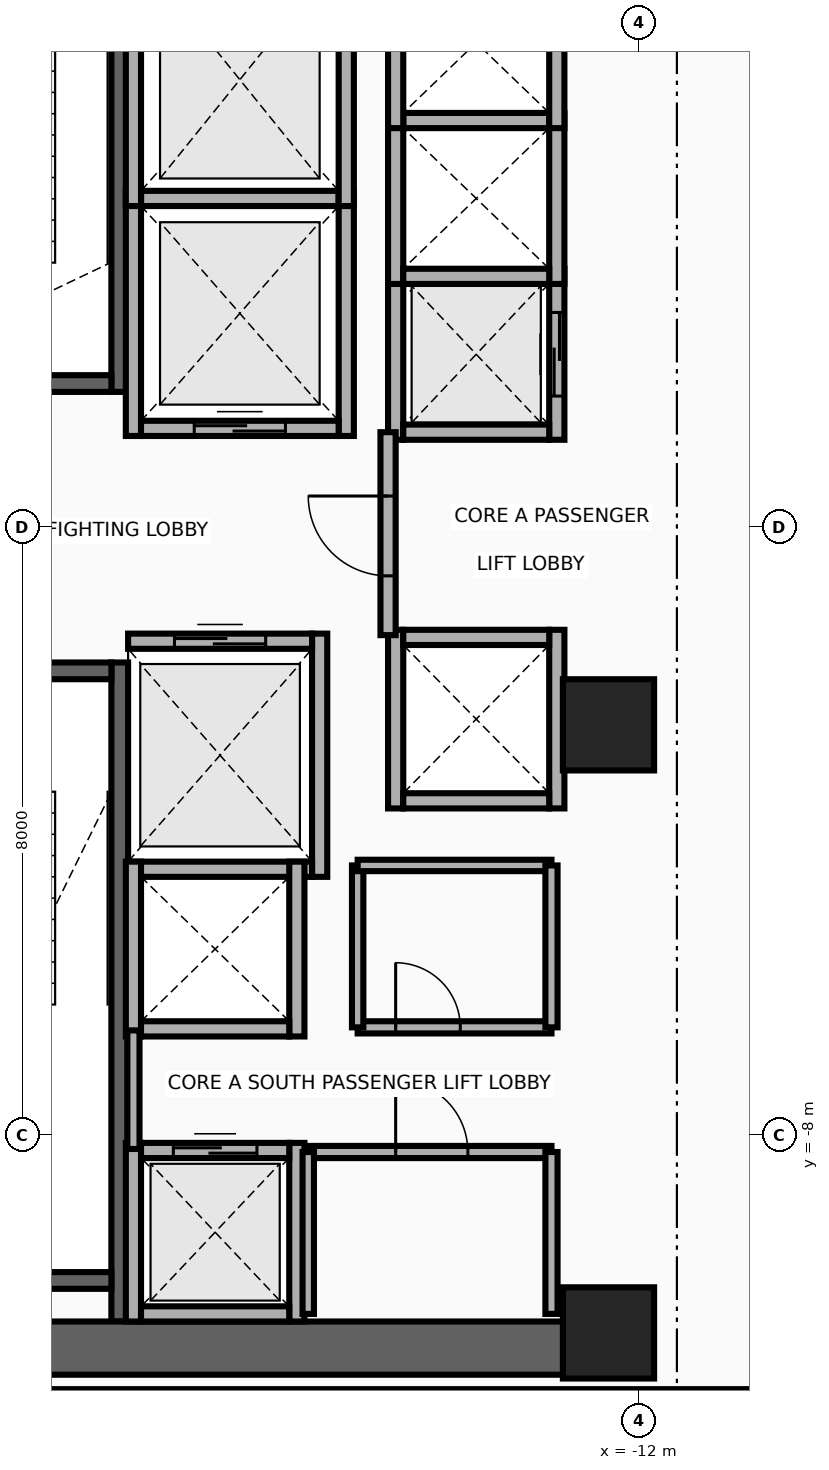
"""IFC4 building model, lengths in metres.
Left out: names, types, materials, properties, quantities, classifications, styles, units other than length and angle.
Written with IfcOpenShell. Run it as: python <this file> out.ifc"""

import sys

from ifc_helpers import new_model, si_unit, direction, frame, frame_2d, origin, origin_2d, place, context, subcontext, project, spatial, rectangle, extrude, source, transform, mapped, element, fill, save


model = new_model("IFC4")
c1 = context("Model", 3, precision=1e-05, world=origin(), true_north=direction((0.0, 1.0)))
c2 = subcontext(c1, "Body", "Model", "MODEL_VIEW")
j1 = project(units=[si_unit("LENGTHUNIT", "METRE"), si_unit("PLANEANGLEUNIT", "RADIAN")], contexts=[c1])
p1 = place(None, origin())
s1 = spatial("IfcSite", under=j1, at=p1, CompositionType="ELEMENT")
p2 = place(p1, origin())
s2 = spatial("IfcBuilding", under=s1, at=p2, CompositionType="ELEMENT")
p3 = place(p2, frame((0.0, 0.0, 142.7)))
s3 = spatial("IfcBuildingStorey", under=s2, at=p3, CompositionType="ELEMENT", Elevation=142.7)
p4 = place(p3, frame((-18.83, 1.78, 0.0), z_axis=(0.0, 0.0, 1.0), x_axis=(0.0, 1.0, 0.0)))
e1 = element("IfcWall", 1, at=p4, inside=s3, PredefinedType="SHEAR", context=c2, shape_type="SweptSolid", body=[
    extrude(rectangle(XDim=8.67, YDim=0.22, at=frame_2d((4.335, 0.0))), origin(), (0.0, 0.0, 1.0), 3.46),
])
p5 = place(p3, frame((-22.05, 1.89, 0.0), z_axis=(0.0, 0.0, 1.0), x_axis=(1.0, 0.0, 0.0)))
e2 = element("IfcWall", 2, at=p5, inside=s3, PredefinedType="SHEAR", context=c2, shape_type="SweptSolid", body=[
    extrude(rectangle(XDim=3.11, YDim=0.22, at=frame_2d((1.555, 0.0))), origin(), (0.0, 0.0, 1.0), 3.46),
])
p6 = place(p5, frame((1.0, 0.0, 0.0)))
e3 = element("IfcOpeningElement", 3, at=p6, cuts=e2, PredefinedType="OPENING", context=c2, shape_type="SweptSolid", body=[
    extrude(rectangle(XDim=1.1, YDim=2.15, at=frame_2d((0.55, 1.075))), frame((0.0, 0.125, 0.0), z_axis=(0.0, -1.0, 0.0), x_axis=(1.0, 0.0, 0.0)), (0.0, 0.0, 1.0), 0.25),
])
p7 = place(p3, frame((-18.83, -10.45, 0.0), z_axis=(0.0, 0.0, 1.0), x_axis=(0.0, 1.0, 0.0)))
e4 = element("IfcWall", 4, at=p7, inside=s3, PredefinedType="SHEAR", context=c2, shape_type="SweptSolid", body=[
    extrude(rectangle(XDim=8.67, YDim=0.22, at=frame_2d((4.335, 0.0))), origin(), (0.0, 0.0, 1.0), 3.46),
])
p8 = place(p3, frame((-22.05, -9.91, 0.0), z_axis=(0.0, 0.0, 1.0), x_axis=(1.0, 0.0, 0.0)))
e5 = element("IfcWall", 5, at=p8, inside=s3, PredefinedType="SHEAR", context=c2, shape_type="SweptSolid", body=[
    extrude(rectangle(XDim=3.11, YDim=0.22, at=frame_2d((1.555, 0.0))), origin(), (0.0, 0.0, 1.0), 3.46),
])
p9 = place(p3, frame((-22.05, -1.89, 0.0), z_axis=(0.0, 0.0, 1.0), x_axis=(1.0, 0.0, 0.0)))
e6 = element("IfcWall", 6, at=p9, inside=s3, PredefinedType="SHEAR", context=c2, shape_type="SweptSolid", body=[
    extrude(rectangle(XDim=3.11, YDim=0.22, at=frame_2d((1.555, 0.0))), origin(), (0.0, 0.0, 1.0), 3.46),
])
p10 = place(p9, frame((1.0, 0.0, 0.0)))
e7 = element("IfcOpeningElement", 7, at=p10, cuts=e6, PredefinedType="OPENING", context=c2, shape_type="SweptSolid", body=[
    extrude(rectangle(XDim=1.1, YDim=2.15, at=frame_2d((0.55, 1.075))), frame((0.0, 0.125, 0.0), z_axis=(0.0, -1.0, 0.0), x_axis=(1.0, 0.0, 0.0)), (0.0, 0.0, 1.0), 0.25),
])
p11 = place(p3, frame((-22.65, -10.8, 0.0), z_axis=(0.0, 0.0, 1.0), x_axis=(1.0, 0.0, 0.0)))
e8 = element("IfcWall", 8, at=p11, inside=s3, PredefinedType="SHEAR", context=c2, shape_type="SweptSolid", body=[
    extrude(rectangle(XDim=10.25, YDim=0.7, at=frame_2d((5.125, 0.0))), origin(), (0.0, 0.0, 1.0), 3.46),
])
m1 = source(origin(), c2, "Body", "SweptSolid", [
    extrude(rectangle(XDim=1.2, YDim=1.2, at=origin_2d()), origin(), (0.0, 0.0, 1.0), 3.7),
])
for number, where, z_axis, x_axis in (
    (9, (-12.4, -10.6, 0.0), (0.0, 0.0, 1.0), (1.0, 0.0, 0.0)),
    (10, (-12.4, -2.6, 0.0), (0.0, 0.0, 1.0), (1.0, 0.0, 0.0)),
):
    element("IfcColumn", number, at=place(p3, frame(where, z_axis=z_axis, x_axis=x_axis)), inside=s3, PredefinedType="COLUMN", context=c2, shape_type="MappedRepresentation", body=[
        mapped(m1, transform((0.0, 0.0, 0.0), x_axis=(1.0, 0.0, 0.0), y_axis=(0.0, 1.0, 0.0), z_axis=(0.0, 0.0, 1.0), scale=1.0)),
    ])
for number, where, z_axis, x_axis in (
    (11, (-18.65, 1.2, 0.0), (0.0, 0.0, 1.0), (0.0, 1.0, 0.0)),
    (12, (-15.85, 1.2, 0.0), (0.0, 0.0, 1.0), (0.0, 1.0, 0.0)),
):
    element("IfcWall", number, at=place(p3, frame(where, z_axis=z_axis, x_axis=x_axis)), inside=s3, PredefinedType="MOVABLE", context=c2, shape_type="SweptSolid", body=[
        extrude(rectangle(XDim=3.225, YDim=0.2, at=frame_2d((1.613, 0.0))), origin(), (0.0, 0.0, 1.0), 3.46),
    ])
p12 = place(p3, frame((-18.55, 1.3, 0.0), z_axis=(0.0, 0.0, 1.0), x_axis=(1.0, 0.0, 0.0)))
e13 = element("IfcWall", 13, at=p12, inside=s3, PredefinedType="MOVABLE", context=c2, shape_type="SweptSolid", body=[
    extrude(rectangle(XDim=2.6, YDim=0.2, at=frame_2d((1.3, 0.0))), origin(), (0.0, 0.0, 1.0), 3.46),
])
p13 = place(p12, frame((0.7, 0.0, 0.0)))
e14 = element("IfcOpeningElement", 14, at=p13, cuts=e13, PredefinedType="OPENING", context=c2, shape_type="SweptSolid", body=[
    extrude(rectangle(XDim=1.2, YDim=2.1, at=frame_2d((0.6, 1.05))), frame((0.0, 0.115, 0.0), z_axis=(0.0, -1.0, 0.0), x_axis=(1.0, 0.0, 0.0)), (0.0, 0.0, 1.0), 0.23),
])
p14 = place(p3, frame((-18.55, 4.325, 0.0), z_axis=(0.0, 0.0, 1.0), x_axis=(1.0, 0.0, 0.0)))
e15 = element("IfcWall", 15, at=p14, inside=s3, PredefinedType="MOVABLE", context=c2, shape_type="SweptSolid", body=[
    extrude(rectangle(XDim=2.6, YDim=0.2, at=frame_2d((1.3, 0.0))), origin(), (0.0, 0.0, 1.0), 3.46),
])
p15 = place(p3, frame((-16.2, -4.6, 0.0), z_axis=(0.0, 0.0, 1.0), x_axis=(0.0, 1.0, 0.0)))
e16 = element("IfcWall", 16, at=p15, inside=s3, PredefinedType="MOVABLE", context=c2, shape_type="SweptSolid", body=[
    extrude(rectangle(XDim=3.2, YDim=0.2, at=frame_2d((1.6, 0.0))), origin(), (0.0, 0.0, 1.0), 3.46),
])
p16 = place(p3, frame((-18.72, -4.5, 0.0), z_axis=(0.0, 0.0, 1.0), x_axis=(1.0, 0.0, 0.0)))
e17 = element("IfcWall", 17, at=p16, inside=s3, PredefinedType="MOVABLE", context=c2, shape_type="SweptSolid", body=[
    extrude(rectangle(XDim=2.42, YDim=0.2, at=frame_2d((1.21, 0.0))), origin(), (0.0, 0.0, 1.0), 3.46),
])
p17 = place(p3, frame((-18.72, -1.5, 0.0), z_axis=(0.0, 0.0, 1.0), x_axis=(1.0, 0.0, 0.0)))
e18 = element("IfcWall", 18, at=p17, inside=s3, PredefinedType="MOVABLE", context=c2, shape_type="SweptSolid", body=[
    extrude(rectangle(XDim=2.42, YDim=0.2, at=frame_2d((1.21, 0.0))), origin(), (0.0, 0.0, 1.0), 3.46),
])
p18 = place(p17, frame((0.61, 0.0, 0.0)))
e19 = element("IfcOpeningElement", 19, at=p18, cuts=e18, PredefinedType="OPENING", context=c2, shape_type="SweptSolid", body=[
    extrude(rectangle(XDim=1.2, YDim=2.1, at=frame_2d((0.6, 1.05))), frame((0.0, 0.115, 0.0), z_axis=(0.0, -1.0, 0.0), x_axis=(1.0, 0.0, 0.0)), (0.0, 0.0, 1.0), 0.23),
])
for number, where, z_axis, x_axis in (
    (20, (-18.65, 4.225, 0.0), (0.0, 0.0, 1.0), (0.0, 1.0, 0.0)),
    (21, (-15.85, 4.225, 0.0), (0.0, 0.0, 1.0), (0.0, 1.0, 0.0)),
):
    element("IfcWall", number, at=place(p3, frame(where, z_axis=z_axis, x_axis=x_axis)), inside=s3, PredefinedType="MOVABLE", context=c2, shape_type="SweptSolid", body=[
        extrude(rectangle(XDim=3.325, YDim=0.2, at=frame_2d((1.663, 0.0))), origin(), (0.0, 0.0, 1.0), 3.46),
    ])
for number, where, z_axis, x_axis in (
    (22, (-18.65, -10.45, 0.0), (0.0, 0.0, 1.0), (0.0, 1.0, 0.0)),
    (23, (-16.5, -10.45, 0.0), (0.0, 0.0, 1.0), (0.0, 1.0, 0.0)),
):
    element("IfcWall", number, at=place(p3, frame(where, z_axis=z_axis, x_axis=x_axis)), inside=s3, PredefinedType="MOVABLE", context=c2, shape_type="SweptSolid", body=[
        extrude(rectangle(XDim=2.35, YDim=0.2, at=frame_2d((1.175, 0.0))), origin(), (0.0, 0.0, 1.0), 2.666),
    ])
p19 = place(p3, frame((-18.55, -10.35, 0.0), z_axis=(0.0, 0.0, 1.0), x_axis=(1.0, 0.0, 0.0)))
e24 = element("IfcWall", 24, at=p19, inside=s3, PredefinedType="MOVABLE", context=c2, shape_type="SweptSolid", body=[
    extrude(rectangle(XDim=1.95, YDim=0.2, at=frame_2d((0.975, 0.0))), origin(), (0.0, 0.0, 1.0), 2.666),
])
p20 = place(p3, frame((-18.55, -8.2, 0.0), z_axis=(0.0, 0.0, 1.0), x_axis=(1.0, 0.0, 0.0)))
e25 = element("IfcWall", 25, at=p20, inside=s3, PredefinedType="MOVABLE", context=c2, shape_type="SweptSolid", body=[
    extrude(rectangle(XDim=1.95, YDim=0.2, at=frame_2d((0.975, 0.0))), origin(), (0.0, 0.0, 1.0), 3.46),
])
p21 = place(p20, frame((0.425, 0.0, 0.0)))
e26 = element("IfcOpeningElement", 26, at=p21, cuts=e25, PredefinedType="OPENING", context=c2, shape_type="SweptSolid", body=[
    extrude(rectangle(XDim=1.1, YDim=2.1, at=frame_2d((0.55, 1.05))), frame((0.0, 0.115, 0.0), z_axis=(0.0, -1.0, 0.0), x_axis=(1.0, 0.0, 0.0)), (0.0, 0.0, 1.0), 0.23),
])
p22 = place(p3, frame((-15.2, 1.15, 0.0), z_axis=(0.0, 0.0, 1.0), x_axis=(0.0, 1.0, 0.0)))
e27 = element("IfcWall", 27, at=p22, inside=s3, PredefinedType="MOVABLE", context=c2, shape_type="SweptSolid", body=[
    extrude(rectangle(XDim=2.25, YDim=0.2, at=frame_2d((1.125, 0.0))), origin(), (0.0, 0.0, 1.0), 3.46),
])
p23 = place(p3, frame((-13.08, 1.15, 0.0), z_axis=(0.0, 0.0, 1.0), x_axis=(0.0, 1.0, 0.0)))
e28 = element("IfcWall", 28, at=p23, inside=s3, PredefinedType="MOVABLE", context=c2, shape_type="SweptSolid", body=[
    extrude(rectangle(XDim=2.25, YDim=0.2, at=frame_2d((1.125, 0.0))), origin(), (0.0, 0.0, 1.0), 3.46),
])
p24 = place(p23, frame((0.575, 0.0, 0.0)))
e29 = element("IfcOpeningElement", 29, at=p24, cuts=e28, PredefinedType="OPENING", context=c2, shape_type="SweptSolid", body=[
    extrude(rectangle(XDim=1.1, YDim=2.1, at=frame_2d((0.55, 1.05))), frame((0.0, 0.115, 0.0), z_axis=(0.0, -1.0, 0.0), x_axis=(1.0, 0.0, 0.0)), (0.0, 0.0, 1.0), 0.23),
])
p25 = place(p3, frame((-15.1, 1.25, 0.0), z_axis=(0.0, 0.0, 1.0), x_axis=(1.0, 0.0, 0.0)))
e30 = element("IfcWall", 30, at=p25, inside=s3, PredefinedType="MOVABLE", context=c2, shape_type="SweptSolid", body=[
    extrude(rectangle(XDim=1.92, YDim=0.2, at=frame_2d((0.96, 0.0))), origin(), (0.0, 0.0, 1.0), 3.46),
])
for number, where, z_axis, x_axis in (
    (31, (-15.2, 3.2, 0.0), (0.0, 0.0, 1.0), (0.0, 1.0, 0.0)),
    (32, (-13.08, 3.2, 0.0), (0.0, 0.0, 1.0), (0.0, 1.0, 0.0)),
):
    element("IfcWall", number, at=place(p3, frame(where, z_axis=z_axis, x_axis=x_axis)), inside=s3, PredefinedType="MOVABLE", context=c2, shape_type="SweptSolid", body=[
        extrude(rectangle(XDim=2.25, YDim=0.2, at=frame_2d((1.125, 0.0))), origin(), (0.0, 0.0, 1.0), 3.46),
    ])
for number, where, z_axis, x_axis in (
    (33, (-15.1, 3.3, 0.0), (0.0, 0.0, 1.0), (1.0, 0.0, 0.0)),
    (34, (-15.1, 5.35, 0.0), (0.0, 0.0, 1.0), (1.0, 0.0, 0.0)),
):
    element("IfcWall", number, at=place(p3, frame(where, z_axis=z_axis, x_axis=x_axis)), inside=s3, PredefinedType="MOVABLE", context=c2, shape_type="SweptSolid", body=[
        extrude(rectangle(XDim=1.92, YDim=0.2, at=frame_2d((0.96, 0.0))), origin(), (0.0, 0.0, 1.0), 3.46),
    ])
for number, where, z_axis, x_axis in (
    (35, (-15.2, 5.25, 0.0), (0.0, 0.0, 1.0), (0.0, 1.0, 0.0)),
    (36, (-13.08, 5.25, 0.0), (0.0, 0.0, 1.0), (0.0, 1.0, 0.0)),
):
    element("IfcWall", number, at=place(p3, frame(where, z_axis=z_axis, x_axis=x_axis)), inside=s3, PredefinedType="MOVABLE", context=c2, shape_type="SweptSolid", body=[
        extrude(rectangle(XDim=2.25, YDim=0.2, at=frame_2d((1.125, 0.0))), origin(), (0.0, 0.0, 1.0), 3.46),
    ])
for number, where, z_axis, x_axis in (
    (37, (-18.65, -6.7, 0.0), (0.0, 0.0, 1.0), (0.0, 1.0, 0.0)),
    (38, (-16.5, -6.7, 0.0), (0.0, 0.0, 1.0), (0.0, 1.0, 0.0)),
):
    element("IfcWall", number, at=place(p3, frame(where, z_axis=z_axis, x_axis=x_axis)), inside=s3, PredefinedType="MOVABLE", context=c2, shape_type="SweptSolid", body=[
        extrude(rectangle(XDim=2.3, YDim=0.2, at=frame_2d((1.15, 0.0))), origin(), (0.0, 0.0, 1.0), 3.46),
    ])
p26 = place(p3, frame((-18.55, -6.6, 0.0), z_axis=(0.0, 0.0, 1.0), x_axis=(1.0, 0.0, 0.0)))
e39 = element("IfcWall", 39, at=p26, inside=s3, PredefinedType="MOVABLE", context=c2, shape_type="SweptSolid", body=[
    extrude(rectangle(XDim=1.95, YDim=0.2, at=frame_2d((0.975, 0.0))), origin(), (0.0, 0.0, 1.0), 3.46),
])
for number, where, z_axis, x_axis in (
    (40, (-15.2, -3.7, 0.0), (0.0, 0.0, 1.0), (0.0, 1.0, 0.0)),
    (41, (-13.08, -3.7, 0.0), (0.0, 0.0, 1.0), (0.0, 1.0, 0.0)),
):
    element("IfcWall", number, at=place(p3, frame(where, z_axis=z_axis, x_axis=x_axis)), inside=s3, PredefinedType="MOVABLE", context=c2, shape_type="SweptSolid", body=[
        extrude(rectangle(XDim=2.35, YDim=0.2, at=frame_2d((1.175, 0.0))), origin(), (0.0, 0.0, 1.0), 3.46),
    ])
for number, where, z_axis, x_axis in (
    (42, (-15.1, -3.6, 0.0), (0.0, 0.0, 1.0), (1.0, 0.0, 0.0)),
    (43, (-15.1, -1.45, 0.0), (0.0, 0.0, 1.0), (1.0, 0.0, 0.0)),
):
    element("IfcWall", number, at=place(p3, frame(where, z_axis=z_axis, x_axis=x_axis)), inside=s3, PredefinedType="MOVABLE", context=c2, shape_type="SweptSolid", body=[
        extrude(rectangle(XDim=1.92, YDim=0.2, at=frame_2d((0.96, 0.0))), origin(), (0.0, 0.0, 1.0), 3.46),
    ])
p27 = place(p3, frame((-15.3, -1.42, 0.0), z_axis=(0.0, 0.0, 1.0), x_axis=(0.0, 1.0, 0.0)))
e44 = element("IfcWall", 44, at=p27, inside=s3, PredefinedType="PARTITIONING", context=c2, shape_type="SweptSolid", body=[
    extrude(rectangle(XDim=2.67, YDim=0.2, at=frame_2d((1.335, 0.0))), origin(), (0.0, 0.0, 1.0), 3.46),
])
p28 = place(p27, frame((0.78, 0.0, 0.0)))
e45 = element("IfcOpeningElement", 45, at=p28, cuts=e44, PredefinedType="OPENING", context=c2, shape_type="SweptSolid", body=[
    extrude(rectangle(XDim=1.05, YDim=2.15, at=frame_2d((0.525, 1.075))), frame((0.0, 0.115, 0.0), z_axis=(0.0, -1.0, 0.0), x_axis=(1.0, 0.0, 0.0)), (0.0, 0.0, 1.0), 0.23),
])
p29 = place(p3, frame((-18.65, -8.18, 0.0), z_axis=(0.0, 0.0, 1.0), x_axis=(0.0, 1.0, 0.0)))
e46 = element("IfcWall", 46, at=p29, inside=s3, PredefinedType="PARTITIONING", context=c2, shape_type="SweptSolid", body=[
    extrude(rectangle(XDim=1.56, YDim=0.16, at=frame_2d((0.78, 0.0))), origin(), (0.0, 0.0, 1.0), 3.46),
])
p30 = place(p3, frame((-16.35, -8.22, 0.0), z_axis=(0.0, 0.0, 1.0), x_axis=(1.0, 0.0, 0.0)))
e47 = element("IfcWall", 47, at=p30, inside=s3, PredefinedType="PARTITIONING", context=c2, shape_type="SweptSolid", body=[
    extrude(rectangle(XDim=3.2, YDim=0.16, at=frame_2d((1.6, 0.0))), origin(), (0.0, 0.0, 1.0), 3.46),
])
p31 = place(p30, frame((1.15, 0.0, 0.0)))
e48 = element("IfcOpeningElement", 48, at=p31, cuts=e47, PredefinedType="OPENING", context=c2, shape_type="SweptSolid", body=[
    extrude(rectangle(XDim=0.95, YDim=2.15, at=frame_2d((0.475, 1.075))), frame((0.0, 0.095, 0.0), z_axis=(0.0, -1.0, 0.0), x_axis=(1.0, 0.0, 0.0)), (0.0, 0.0, 1.0), 0.19),
])
p32 = place(p3, frame((-16.35, -10.35, 0.0), z_axis=(0.0, 0.0, 1.0), x_axis=(0.0, 1.0, 0.0)))
e49 = element("IfcWall", 49, at=p32, inside=s3, PredefinedType="PARTITIONING", context=c2, shape_type="SweptSolid", body=[
    extrude(rectangle(XDim=2.13, YDim=0.15, at=frame_2d((1.065, 0.0))), origin(), (0.0, 0.0, 1.0), 3.46),
])
p33 = place(p3, frame((-13.15, -10.35, 0.0), z_axis=(0.0, 0.0, 1.0), x_axis=(0.0, 1.0, 0.0)))
e50 = element("IfcWall", 50, at=p33, inside=s3, PredefinedType="PARTITIONING", context=c2, shape_type="SweptSolid", body=[
    extrude(rectangle(XDim=2.13, YDim=0.16, at=frame_2d((1.065, 0.0))), origin(), (0.0, 0.0, 1.0), 3.46),
])
p34 = place(p3, frame((-15.7, -6.58, 0.0), z_axis=(0.0, 0.0, 1.0), x_axis=(1.0, 0.0, 0.0)))
e51 = element("IfcWall", 51, at=p34, inside=s3, PredefinedType="PARTITIONING", context=c2, shape_type="SweptSolid", body=[
    extrude(rectangle(XDim=2.55, YDim=0.16, at=frame_2d((1.275, 0.0))), origin(), (0.0, 0.0, 1.0), 3.46),
])
p35 = place(p34, frame((0.5, 0.0, 0.0)))
e52 = element("IfcOpeningElement", 52, at=p35, cuts=e51, PredefinedType="OPENING", context=c2, shape_type="SweptSolid", body=[
    extrude(rectangle(XDim=0.85, YDim=2.05, at=frame_2d((0.425, 1.025))), frame((0.0, 0.095, 0.0), z_axis=(0.0, -1.0, 0.0), x_axis=(1.0, 0.0, 0.0)), (0.0, 0.0, 1.0), 0.19),
])
p36 = place(p3, frame((-15.7, -6.58, 0.0), z_axis=(0.0, 0.0, 1.0), x_axis=(0.0, 1.0, 0.0)))
e53 = element("IfcWall", 53, at=p36, inside=s3, PredefinedType="PARTITIONING", context=c2, shape_type="SweptSolid", body=[
    extrude(rectangle(XDim=2.13, YDim=0.15, at=frame_2d((1.065, 0.0))), origin(), (0.0, 0.0, 1.0), 3.46),
])
p37 = place(p3, frame((-15.7, -4.45, 0.0), z_axis=(0.0, 0.0, 1.0), x_axis=(1.0, 0.0, 0.0)))
e54 = element("IfcWall", 54, at=p37, inside=s3, PredefinedType="PARTITIONING", context=c2, shape_type="SweptSolid", body=[
    extrude(rectangle(XDim=2.55, YDim=0.15, at=frame_2d((1.275, 0.0))), origin(), (0.0, 0.0, 1.0), 3.46),
])
p38 = place(p3, frame((-13.15, -6.58, 0.0), z_axis=(0.0, 0.0, 1.0), x_axis=(0.0, 1.0, 0.0)))
e55 = element("IfcWall", 55, at=p38, inside=s3, PredefinedType="PARTITIONING", context=c2, shape_type="SweptSolid", body=[
    extrude(rectangle(XDim=2.13, YDim=0.16, at=frame_2d((1.065, 0.0))), origin(), (0.0, 0.0, 1.0), 3.46),
])
p39 = place(p3, frame((-23.45, -11.42, 0.0), z_axis=(0.0, 0.0, 1.0), x_axis=(1.0, 0.0, 0.0)))
e56 = element("IfcWall", 56, at=p39, inside=s3, PredefinedType="PARTITIONING", context=c2, shape_type="SweptSolid", body=[
    extrude(rectangle(XDim=13.84, YDim=0.16, at=frame_2d((6.92, 0.0))), origin(), (0.0, 0.0, 1.0), 2.834),
])
p40 = place(p13, origin())
e57 = element("IfcDoor", 57, at=p40, inside=s3, OperationType="DOUBLE_DOOR_SLIDING", PredefinedType="DOOR", context=c2, shape_type="SweptSolid", body=[
    extrude(rectangle(XDim=1.2, YDim=2.1, at=frame_2d((0.6, 1.05))), frame((0.0, 0.025, 0.0), z_axis=(0.0, -1.0, 0.0), x_axis=(1.0, 0.0, 0.0)), (0.0, 0.0, 1.0), 0.05),
])
fill(e14, e57)
p41 = place(p18, origin())
e58 = element("IfcDoor", 58, at=p41, inside=s3, OperationType="DOUBLE_DOOR_SLIDING", PredefinedType="DOOR", context=c2, shape_type="SweptSolid", body=[
    extrude(rectangle(XDim=1.2, YDim=2.1, at=frame_2d((0.6, 1.05))), frame((0.0, 0.025, 0.0), z_axis=(0.0, -1.0, 0.0), x_axis=(1.0, 0.0, 0.0)), (0.0, 0.0, 1.0), 0.05),
])
fill(e19, e58)
p42 = place(p21, origin())
e59 = element("IfcDoor", 59, at=p42, inside=s3, OperationType="DOUBLE_DOOR_SLIDING", PredefinedType="DOOR", context=c2, shape_type="SweptSolid", body=[
    extrude(rectangle(XDim=1.1, YDim=2.1, at=frame_2d((0.55, 1.05))), frame((0.0, 0.025, 0.0), z_axis=(0.0, -1.0, 0.0), x_axis=(1.0, 0.0, 0.0)), (0.0, 0.0, 1.0), 0.05),
])
fill(e26, e59)
p43 = place(p24, origin())
e60 = element("IfcDoor", 60, at=p43, inside=s3, OperationType="DOUBLE_DOOR_SLIDING", PredefinedType="DOOR", context=c2, shape_type="SweptSolid", body=[
    extrude(rectangle(XDim=1.1, YDim=2.1, at=frame_2d((0.55, 1.05))), frame((0.0, 0.025, 0.0), z_axis=(0.0, -1.0, 0.0), x_axis=(1.0, 0.0, 0.0)), (0.0, 0.0, 1.0), 0.05),
])
fill(e29, e60)
p44 = place(p28, origin())
e61 = element("IfcDoor", 61, at=p44, inside=s3, OperationType="SINGLE_SWING_RIGHT", PredefinedType="DOOR", context=c2, shape_type="SweptSolid", body=[
    extrude(rectangle(XDim=1.05, YDim=2.15, at=frame_2d((0.525, 1.075))), frame((0.0, 0.025, 0.0), z_axis=(0.0, -1.0, 0.0), x_axis=(1.0, 0.0, 0.0)), (0.0, 0.0, 1.0), 0.05),
])
fill(e45, e61)
p45 = place(p31, origin())
e62 = element("IfcDoor", 62, at=p45, inside=s3, OperationType="SINGLE_SWING_LEFT", PredefinedType="DOOR", context=c2, shape_type="SweptSolid", body=[
    extrude(rectangle(XDim=0.95, YDim=2.15, at=frame_2d((0.475, 1.075))), frame((0.0, 0.025, 0.0), z_axis=(0.0, -1.0, 0.0), x_axis=(1.0, 0.0, 0.0)), (0.0, 0.0, 1.0), 0.05),
])
fill(e48, e62)
p46 = place(p35, origin())
e63 = element("IfcDoor", 63, at=p46, inside=s3, OperationType="SINGLE_SWING_RIGHT", PredefinedType="DOOR", context=c2, shape_type="SweptSolid", body=[
    extrude(rectangle(XDim=0.85, YDim=2.05, at=frame_2d((0.425, 1.025))), frame((0.0, 0.025, 0.0), z_axis=(0.0, -1.0, 0.0), x_axis=(1.0, 0.0, 0.0)), (0.0, 0.0, 1.0), 0.05),
])
fill(e52, e63)
save(model, sys.argv[1])
